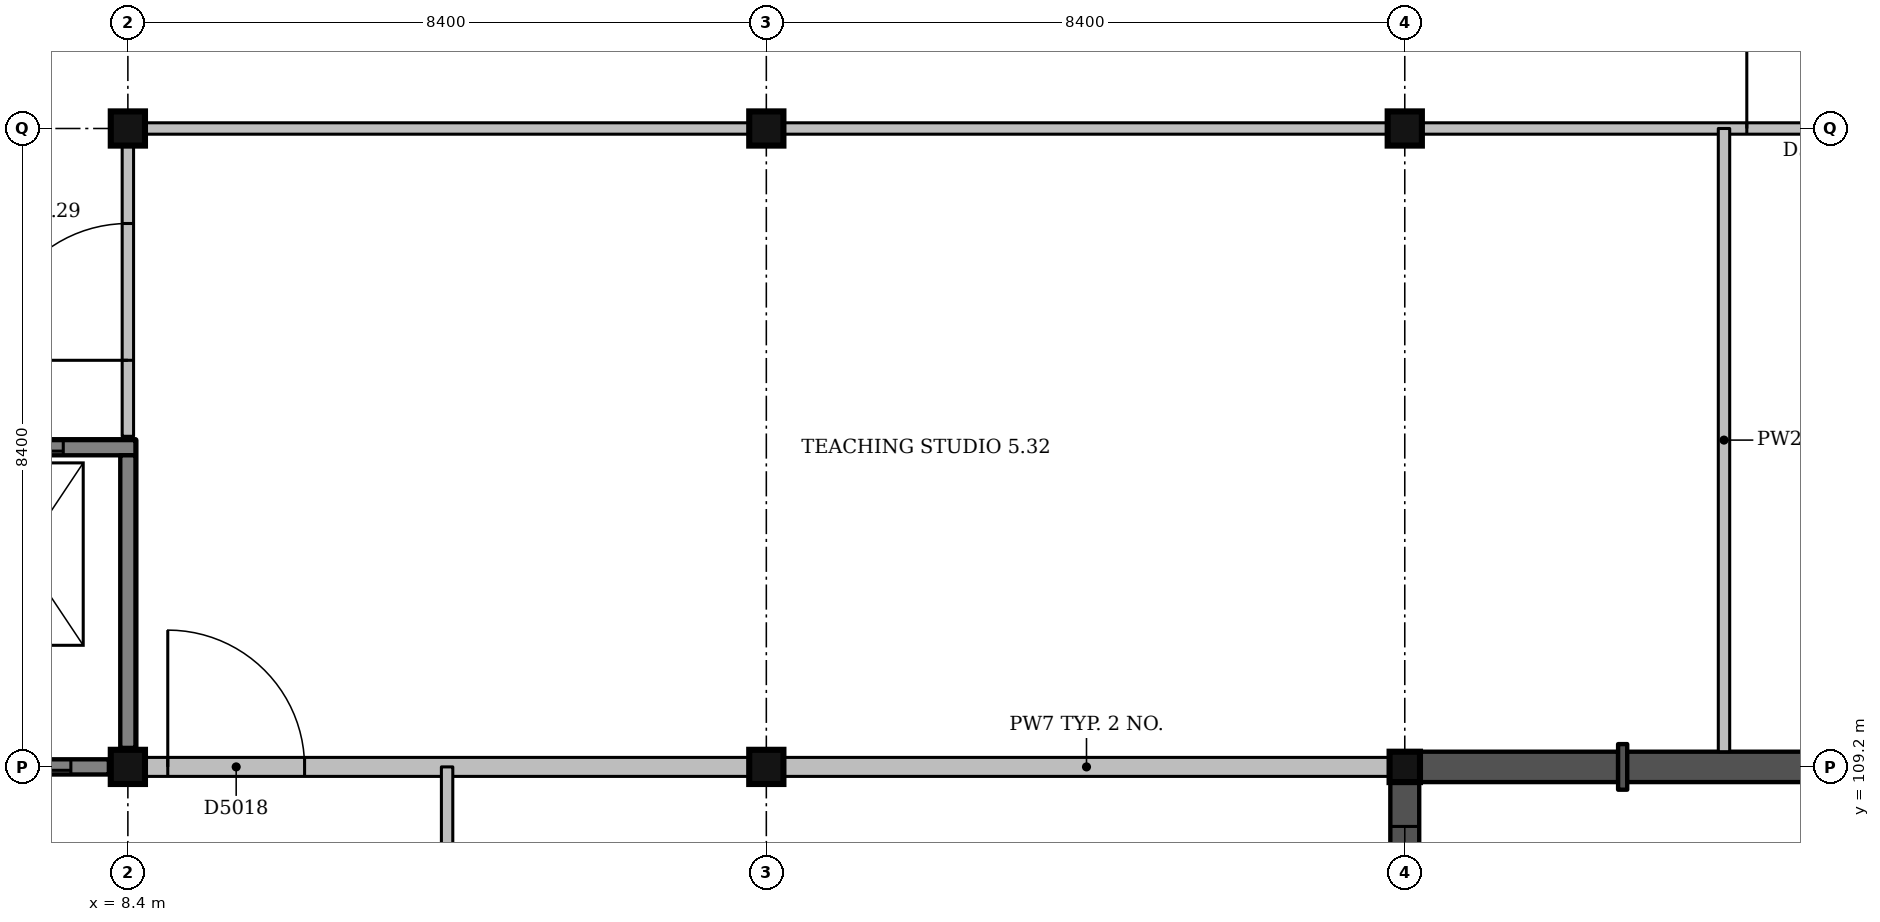
"""IFC4 building model, lengths in metres.
Left out: names, types, materials, properties, quantities, classifications, styles, units other than length and angle.
Written with IfcOpenShell. Run it as: python <this file> out.ifc"""

import sys

from ifc_helpers import new_model, si_unit, direction, frame, frame_2d, origin, origin_2d, place, context, subcontext, project, spatial, rectangle, extrude, element, fill, save


model = new_model("IFC4")
c1 = context("Model", 3, precision=1e-05, world=origin(), true_north=direction((0.0, 1.0)))
c2 = subcontext(c1, "Body", "Model", "MODEL_VIEW")
j1 = project(units=[si_unit("LENGTHUNIT", "METRE"), si_unit("PLANEANGLEUNIT", "RADIAN")], contexts=[c1])
p1 = place(None, origin())
s1 = spatial("IfcSite", under=j1, at=p1, CompositionType="ELEMENT")
p2 = place(p1, origin())
s2 = spatial("IfcBuilding", under=s1, at=p2, CompositionType="ELEMENT")
p3 = place(p2, frame((0.0, 0.0, 22.5)))
s3 = spatial("IfcBuildingStorey", under=s2, at=p3, CompositionType="ELEMENT", Elevation=22.5)
for number, where, z_axis, x_axis in (
    (1, (8.4, 109.2, 0.0), (0.0, 0.0, 1.0), (1.0, 0.0, 0.0)),
    (2, (16.8, 109.2, 0.0), (0.0, 0.0, 1.0), (1.0, 0.0, 0.0)),
):
    element("IfcColumn", number, at=place(p3, frame(where, z_axis=z_axis, x_axis=x_axis)), inside=s3, PredefinedType="COLUMN", context=c2, shape_type="SweptSolid", body=[
        extrude(rectangle(XDim=0.45, YDim=0.45, at=origin_2d()), origin(), (0.0, 0.0, 1.0), 4.5),
    ])
p4 = place(p3, frame((25.2, 109.2, 0.0), z_axis=(0.0, 0.0, 1.0), x_axis=(1.0, 0.0, 0.0)))
e3 = element("IfcColumn", 3, at=p4, inside=s3, PredefinedType="COLUMN", context=c2, shape_type="SweptSolid", body=[
    extrude(rectangle(XDim=0.4, YDim=0.4, at=origin_2d()), origin(), (0.0, 0.0, 1.0), 4.5),
])
for number, where, z_axis, x_axis in (
    (4, (8.4, 117.6, 0.0), (0.0, 0.0, 1.0), (1.0, 0.0, 0.0)),
    (5, (16.8, 117.6, 0.0), (0.0, 0.0, 1.0), (1.0, 0.0, 0.0)),
    (6, (25.2, 117.6, 0.0), (0.0, 0.0, 1.0), (1.0, 0.0, 0.0)),
):
    element("IfcColumn", number, at=place(p3, frame(where, z_axis=z_axis, x_axis=x_axis)), inside=s3, PredefinedType="COLUMN", context=c2, shape_type="SweptSolid", body=[
        extrude(rectangle(XDim=0.45, YDim=0.45, at=origin_2d()), origin(), (0.0, 0.0, 1.0), 4.5),
    ])
p5 = place(p3, frame((5.5, 109.2, 0.0), z_axis=(0.0, 0.0, 1.0), x_axis=(1.0, 0.0, 0.0)))
e7 = element("IfcWall", 7, at=p5, inside=s3, PredefinedType="SHEAR", context=c2, shape_type="SweptSolid", body=[
    extrude(rectangle(XDim=2.65, YDim=0.2, at=frame_2d((1.325, 0.0))), origin(), (0.0, 0.0, 1.0), 4.5),
])
p6 = place(p5, frame((1.05, 0.0, 0.0)))
e8 = element("IfcOpeningElement", 8, at=p6, cuts=e7, PredefinedType="OPENING", context=c2, shape_type="SweptSolid", body=[
    extrude(rectangle(XDim=1.1, YDim=2.1, at=frame_2d((0.55, 1.05))), frame((0.0, 0.11, 0.0), z_axis=(0.0, -1.0, 0.0), x_axis=(1.0, 0.0, 0.0)), (0.0, 0.0, 1.0), 0.22),
])
p7 = place(p3, frame((5.5, 113.4, 0.0), z_axis=(0.0, 0.0, 1.0), x_axis=(1.0, 0.0, 0.0)))
e9 = element("IfcWall", 9, at=p7, inside=s3, PredefinedType="SHEAR", context=c2, shape_type="SweptSolid", body=[
    extrude(rectangle(XDim=3.0, YDim=0.2, at=frame_2d((1.5, 0.0))), origin(), (0.0, 0.0, 1.0), 4.5),
])
p8 = place(p7, frame((0.95, 0.0, 0.0)))
e10 = element("IfcOpeningElement", 10, at=p8, cuts=e9, PredefinedType="OPENING", context=c2, shape_type="SweptSolid", body=[
    extrude(rectangle(XDim=1.1, YDim=2.1, at=frame_2d((0.55, 1.05))), frame((0.0, 0.11, 0.0), z_axis=(0.0, -1.0, 0.0), x_axis=(1.0, 0.0, 0.0)), (0.0, 0.0, 1.0), 0.22),
])
p9 = place(p3, frame((8.4, 109.45, 0.0), z_axis=(0.0, 0.0, 1.0), x_axis=(0.0, 1.0, 0.0)))
e11 = element("IfcWall", 11, at=p9, inside=s3, PredefinedType="SHEAR", context=c2, shape_type="SweptSolid", body=[
    extrude(rectangle(XDim=3.85, YDim=0.2, at=frame_2d((1.925, 0.0))), origin(), (0.0, 0.0, 1.0), 4.5),
])
p10 = place(p3, frame((25.2, 106.633, 0.0), z_axis=(0.0, 0.0, 1.0), x_axis=(0.0, 1.0, 0.0)))
e12 = element("IfcWall", 12, at=p10, inside=s3, PredefinedType="SOLIDWALL", context=c2, shape_type="SweptSolid", body=[
    extrude(rectangle(XDim=2.367, YDim=0.38, at=frame_2d((1.183, 0.0))), origin(), (0.0, 0.0, 1.0), 3.35),
])
p11 = place(p10, frame((0.583, 0.0, 0.9)))
e13 = element("IfcOpeningElement", 13, at=p11, cuts=e12, PredefinedType="OPENING", context=c2, shape_type="SweptSolid", body=[
    extrude(rectangle(XDim=1.2, YDim=2.1, at=frame_2d((0.6, 1.05))), frame((0.0, 0.2, 0.0), z_axis=(0.0, -1.0, 0.0), x_axis=(1.0, 0.0, 0.0)), (0.0, 0.0, 1.0), 0.4),
])
p12 = place(p3, frame((25.4, 109.2, 0.0), z_axis=(0.0, 0.0, 1.0), x_axis=(1.0, 0.0, 0.0)))
e14 = element("IfcWall", 14, at=p12, inside=s3, PredefinedType="SOLIDWALL", context=c2, shape_type="SweptSolid", body=[
    extrude(rectangle(XDim=2.607, YDim=0.4, at=frame_2d((1.303, 0.0))), origin(), (0.0, 0.0, 1.0), 4.2),
])
p13 = place(p3, frame((28.007, 109.2, 0.0), z_axis=(0.0, 0.0, 1.0), x_axis=(1.0, 0.0, 0.0)))
e15 = element("IfcWall", 15, at=p13, inside=s3, PredefinedType="SOLIDWALL", context=c2, shape_type="SweptSolid", body=[
    extrude(rectangle(XDim=0.12, YDim=0.6, at=frame_2d((0.06, 0.0))), origin(), (0.0, 0.0, 1.0), 4.2),
])
p14 = place(p3, frame((28.127, 109.2, 0.0), z_axis=(0.0, 0.0, 1.0), x_axis=(1.0, 0.0, 0.0)))
e16 = element("IfcWall", 16, at=p14, inside=s3, PredefinedType="SOLIDWALL", context=c2, shape_type="SweptSolid", body=[
    extrude(rectangle(XDim=2.547, YDim=0.4, at=frame_2d((1.273, 0.0))), origin(), (0.0, 0.0, 1.0), 4.2),
])
p15 = place(p3, frame((8.625, 109.2, 0.0), z_axis=(0.0, 0.0, 1.0), x_axis=(1.0, 0.0, 0.0)))
e17 = element("IfcWall", 17, at=p15, inside=s3, PredefinedType="SOLIDWALL", context=c2, shape_type="SweptSolid", body=[
    extrude(rectangle(XDim=7.95, YDim=0.25, at=frame_2d((3.975, 0.0))), origin(), (0.0, 0.0, 1.0), 3.4),
])
p16 = place(p15, frame((0.3, 0.0, 0.0)))
e18 = element("IfcOpeningElement", 18, at=p16, cuts=e17, PredefinedType="OPENING", context=c2, shape_type="SweptSolid", body=[
    extrude(rectangle(XDim=1.8, YDim=2.1, at=frame_2d((0.9, 1.05))), frame((0.0, 0.135, 0.0), z_axis=(0.0, -1.0, 0.0), x_axis=(1.0, 0.0, 0.0)), (0.0, 0.0, 1.0), 0.27),
])
p17 = place(p3, frame((17.025, 109.2, 0.0), z_axis=(0.0, 0.0, 1.0), x_axis=(1.0, 0.0, 0.0)))
e19 = element("IfcWall", 19, at=p17, inside=s3, PredefinedType="SOLIDWALL", context=c2, shape_type="SweptSolid", body=[
    extrude(rectangle(XDim=7.975, YDim=0.25, at=frame_2d((3.988, 0.0))), origin(), (0.0, 0.0, 1.0), 3.35),
])
p18 = place(p3, frame((8.625, 117.6, 0.0), z_axis=(0.0, 0.0, 1.0), x_axis=(1.0, 0.0, 0.0)))
e20 = element("IfcWall", 20, at=p18, inside=s3, PredefinedType="PARTITIONING", context=c2, shape_type="SweptSolid", body=[
    extrude(rectangle(XDim=7.95, YDim=0.15, at=frame_2d((3.975, 0.0))), origin(), (0.0, 0.0, 1.0), 3.4),
])
p19 = place(p3, frame((17.025, 117.6, 0.0), z_axis=(0.0, 0.0, 1.0), x_axis=(1.0, 0.0, 0.0)))
e21 = element("IfcWall", 21, at=p19, inside=s3, PredefinedType="PARTITIONING", context=c2, shape_type="SweptSolid", body=[
    extrude(rectangle(XDim=7.95, YDim=0.15, at=frame_2d((3.975, 0.0))), origin(), (0.0, 0.0, 1.0), 3.4),
])
p20 = place(p3, frame((25.425, 117.6, 0.0), z_axis=(0.0, 0.0, 1.0), x_axis=(1.0, 0.0, 0.0)))
e22 = element("IfcWall", 22, at=p20, inside=s3, PredefinedType="PARTITIONING", context=c2, shape_type="SweptSolid", body=[
    extrude(rectangle(XDim=7.95, YDim=0.15, at=frame_2d((3.975, 0.0))), origin(), (0.0, 0.0, 1.0), 3.4),
])
p21 = place(p20, frame((4.275, 0.0, 0.0)))
e23 = element("IfcOpeningElement", 23, at=p21, cuts=e22, PredefinedType="OPENING", context=c2, shape_type="SweptSolid", body=[
    extrude(rectangle(XDim=1.8, YDim=2.1, at=frame_2d((0.9, 1.05))), frame((0.0, 0.085, 0.0), z_axis=(0.0, -1.0, 0.0), x_axis=(1.0, 0.0, 0.0)), (0.0, 0.0, 1.0), 0.17),
])
p22 = place(p3, frame((8.4, 113.55, 0.0), z_axis=(0.0, 0.0, 1.0), x_axis=(0.0, 1.0, 0.0)))
e24 = element("IfcWall", 24, at=p22, inside=s3, PredefinedType="PARTITIONING", context=c2, shape_type="SweptSolid", body=[
    extrude(rectangle(XDim=3.825, YDim=0.15, at=frame_2d((1.913, 0.0))), origin(), (0.0, 0.0, 1.0), 3.4),
])
p23 = place(p22, frame((1.0, 0.0, 0.0)))
e25 = element("IfcOpeningElement", 25, at=p23, cuts=e24, PredefinedType="OPENING", context=c2, shape_type="SweptSolid", body=[
    extrude(rectangle(XDim=1.8, YDim=2.1, at=frame_2d((0.9, 1.05))), frame((0.0, 0.085, 0.0), z_axis=(0.0, -1.0, 0.0), x_axis=(1.0, 0.0, 0.0)), (0.0, 0.0, 1.0), 0.17),
])
p24 = place(p3, frame((12.6, 105.0, 0.0), z_axis=(0.0, 0.0, 1.0), x_axis=(0.0, 1.0, 0.0)))
e26 = element("IfcWall", 26, at=p24, inside=s3, PredefinedType="PARTITIONING", context=c2, shape_type="SweptSolid", body=[
    extrude(rectangle(XDim=4.2, YDim=0.15, at=frame_2d((2.1, 0.0))), origin(), (0.0, 0.0, 1.0), 4.15),
])
p25 = place(p24, frame((1.7, 0.0, 0.0)))
e27 = element("IfcOpeningElement", 27, at=p25, cuts=e26, PredefinedType="OPENING", context=c2, shape_type="SweptSolid", body=[
    extrude(rectangle(XDim=0.9, YDim=2.1, at=frame_2d((0.45, 1.05))), frame((0.0, 0.085, 0.0), z_axis=(0.0, -1.0, 0.0), x_axis=(1.0, 0.0, 0.0)), (0.0, 0.0, 1.0), 0.17),
])
p26 = place(p3, frame((29.4, 109.4, 0.0), z_axis=(0.0, 0.0, 1.0), x_axis=(0.0, 1.0, 0.0)))
e28 = element("IfcWall", 28, at=p26, inside=s3, PredefinedType="PARTITIONING", context=c2, shape_type="SweptSolid", body=[
    extrude(rectangle(XDim=8.2, YDim=0.15, at=frame_2d((4.1, 0.0))), origin(), (0.0, 0.0, 1.0), 3.4),
])
p27 = place(p11, origin())
e29 = element("IfcWindow", 29, at=p27, inside=s3, PartitioningType="SINGLE_PANEL", PredefinedType="WINDOW", context=c2, shape_type="SweptSolid", body=[
    extrude(rectangle(XDim=1.2, YDim=2.1, at=frame_2d((0.6, 1.05))), frame((0.0, 0.15, 0.0), z_axis=(0.0, -1.0, 0.0), x_axis=(1.0, 0.0, 0.0)), (0.0, 0.0, 1.0), 0.06),
])
fill(e13, e29)
p28 = place(p23, origin())
e30 = element("IfcDoor", 30, at=p28, inside=s3, OperationType="DOUBLE_DOOR_SINGLE_SWING", PredefinedType="DOOR", context=c2, shape_type="SweptSolid", body=[
    extrude(rectangle(XDim=1.8, YDim=2.1, at=frame_2d((0.9, 1.05))), frame((0.0, 0.025, 0.0), z_axis=(0.0, -1.0, 0.0), x_axis=(1.0, 0.0, 0.0)), (0.0, 0.0, 1.0), 0.05),
])
fill(e25, e30)
p29 = place(p16, origin())
e31 = element("IfcDoor", 31, at=p29, inside=s3, OperationType="DOUBLE_DOOR_SINGLE_SWING", PredefinedType="DOOR", context=c2, shape_type="SweptSolid", body=[
    extrude(rectangle(XDim=1.8, YDim=2.1, at=frame_2d((0.9, 1.05))), frame((0.0, 0.025, 0.0), z_axis=(0.0, -1.0, 0.0), x_axis=(1.0, 0.0, 0.0)), (0.0, 0.0, 1.0), 0.05),
])
fill(e18, e31)
p30 = place(p21, origin())
e32 = element("IfcDoor", 32, at=p30, inside=s3, OperationType="DOUBLE_DOOR_SINGLE_SWING", PredefinedType="DOOR", context=c2, shape_type="SweptSolid", body=[
    extrude(rectangle(XDim=1.8, YDim=2.1, at=frame_2d((0.9, 1.05))), frame((0.0, 0.025, 0.0), z_axis=(0.0, -1.0, 0.0), x_axis=(1.0, 0.0, 0.0)), (0.0, 0.0, 1.0), 0.05),
])
fill(e23, e32)
p31 = place(p6, origin())
e33 = element("IfcDoor", 33, at=p31, inside=s3, OperationType="SLIDING_TO_LEFT", PredefinedType="DOOR", context=c2, shape_type="SweptSolid", body=[
    extrude(rectangle(XDim=1.1, YDim=2.1, at=frame_2d((0.55, 1.05))), frame((0.0, 0.025, 0.0), z_axis=(0.0, -1.0, 0.0), x_axis=(1.0, 0.0, 0.0)), (0.0, 0.0, 1.0), 0.05),
])
fill(e8, e33)
p32 = place(p8, origin())
e34 = element("IfcDoor", 34, at=p32, inside=s3, OperationType="SLIDING_TO_RIGHT", PredefinedType="DOOR", context=c2, shape_type="SweptSolid", body=[
    extrude(rectangle(XDim=1.1, YDim=2.1, at=frame_2d((0.55, 1.05))), frame((0.0, 0.025, 0.0), z_axis=(0.0, -1.0, 0.0), x_axis=(1.0, 0.0, 0.0)), (0.0, 0.0, 1.0), 0.05),
])
fill(e10, e34)
save(model, sys.argv[1])
